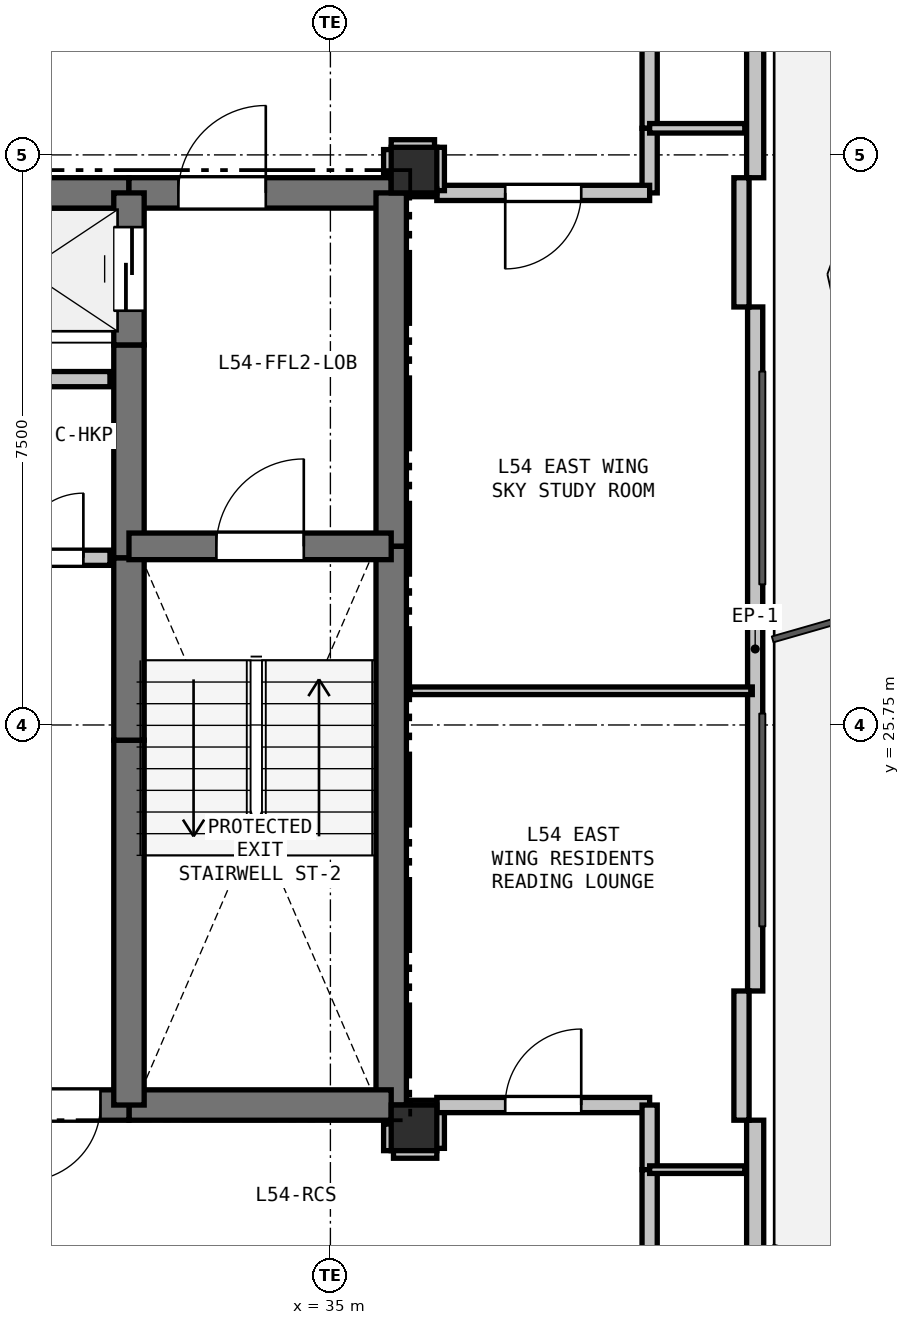
"""IFC4 building model, lengths in metres.
Left out: names, types, materials, properties, quantities, classifications, styles, units other than length and angle.
Written with IfcOpenShell. Run it as: python <this file> out.ifc"""

import sys

from ifc_helpers import new_model, si_unit, direction, frame, frame_2d, origin, origin_2d, place, context, subcontext, project, spatial, rectangle, extrude, element, fill, save


model = new_model("IFC4")
c1 = context("Model", 3, precision=1e-05, world=origin(), true_north=direction((0.0, 1.0)))
c2 = subcontext(c1, "Body", "Model", "MODEL_VIEW")
j1 = project(units=[si_unit("LENGTHUNIT", "METRE"), si_unit("PLANEANGLEUNIT", "RADIAN")], contexts=[c1])
p1 = place(None, origin())
s1 = spatial("IfcSite", under=j1, at=p1, CompositionType="ELEMENT")
p2 = place(p1, origin())
s2 = spatial("IfcBuilding", under=s1, at=p2, CompositionType="ELEMENT")
p3 = place(p2, frame((0.0, 0.0, 195.3)))
s3 = spatial("IfcBuildingStorey", under=s2, at=p3, CompositionType="ELEMENT", Elevation=195.3)
for number, where, z_axis, x_axis in (
    (1, (36.1, 33.05, 0.0), (0.0, 0.0, 1.0), (1.0, 0.0, 0.0)),
    (2, (36.1, 20.45, 0.0), (0.0, 0.0, 1.0), (1.0, 0.0, 0.0)),
):
    element("IfcColumn", number, at=place(p3, frame(where, z_axis=z_axis, x_axis=x_axis)), inside=s3, PredefinedType="COLUMN", context=c2, shape_type="SweptSolid", body=[
        extrude(rectangle(XDim=0.6, YDim=0.6, at=origin_2d()), origin(), (0.0, 0.0, 1.0), 3.3),
    ])
p4 = place(p3, frame((40.588, 42.648, 0.0), z_axis=(0.0, 0.0, 1.0), x_axis=(0.0, -1.0, 0.0)))
e3 = element("IfcWall", 3, at=p4, inside=s3, PredefinedType="SOLIDWALL", context=c2, shape_type="SweptSolid", body=[
    extrude(rectangle(XDim=9.699, YDim=0.225, at=frame_2d((4.85, 0.0))), origin(), (0.0, 0.0, 1.0), 2.69),
])
p5 = place(p4, frame((1.73, 0.0, 0.0)))
e4 = element("IfcOpeningElement", 4, at=p5, cuts=e3, PredefinedType="OPENING", context=c2, shape_type="SweptSolid", body=[
    extrude(rectangle(XDim=1.0, YDim=2.1, at=frame_2d((0.5, 1.05))), frame((0.0, 0.123, 0.0), z_axis=(0.0, -1.0, 0.0), x_axis=(1.0, 0.0, 0.0)), (0.0, 0.0, 1.0), 0.245),
])
p6 = place(p3, frame((40.588, 31.25, 0.0), z_axis=(0.0, 0.0, 1.0), x_axis=(0.0, -1.0, 0.0)))
e5 = element("IfcWall", 5, at=p6, inside=s3, PredefinedType="PARAPET", context=c2, shape_type="SweptSolid", body=[
    extrude(rectangle(XDim=8.999, YDim=0.2, at=frame_2d((4.5, 0.0))), origin(), (0.0, 0.0, 1.0), 0.2),
])
p7 = place(p3, frame((40.588, 20.551, 0.0), z_axis=(0.0, 0.0, 1.0), x_axis=(0.0, -1.0, 0.0)))
e6 = element("IfcWall", 6, at=p7, inside=s3, PredefinedType="SOLIDWALL", context=c2, shape_type="SweptSolid", body=[
    extrude(rectangle(XDim=9.699, YDim=0.225, at=frame_2d((4.85, 0.0))), origin(), (0.0, 0.0, 1.0), 2.69),
])
p8 = place(p7, frame((6.395, 0.0, 0.9)))
e7 = element("IfcOpeningElement", 7, at=p8, cuts=e6, PredefinedType="OPENING", context=c2, shape_type="SweptSolid", body=[
    extrude(rectangle(XDim=1.5, YDim=1.5, at=frame_2d((0.75, 0.75))), frame((0.0, 0.123, 0.0), z_axis=(0.0, -1.0, 0.0), x_axis=(1.0, 0.0, 0.0)), (0.0, 0.0, 1.0), 0.245),
])
for number, where, z_axis, x_axis in (
    (8, (40.408, 32.949, 0.0), (0.0, 0.0, 1.0), (0.0, -1.0, 0.0)),
    (9, (40.408, 22.25, 0.0), (0.0, 0.0, 1.0), (0.0, -1.0, 0.0)),
):
    element("IfcWall", number, at=place(p3, frame(where, z_axis=z_axis, x_axis=x_axis)), inside=s3, PredefinedType="PARAPET", context=c2, shape_type="SweptSolid", body=[
        extrude(rectangle(XDim=1.7, YDim=0.2, at=frame_2d((0.85, 0.0))), origin(), (0.0, 0.0, 1.0), 2.69),
    ])
p9 = place(p3, frame((29.65, 32.75, 0.0), z_axis=(0.0, 0.0, 1.0), x_axis=(1.0, 0.0, 0.0)))
e10 = element("IfcWall", 10, at=p9, inside=s3, PredefinedType="SHEAR", context=c2, shape_type="SweptSolid", body=[
    extrude(rectangle(XDim=2.7, YDim=0.4, at=frame_2d((1.35, 0.0))), origin(), (0.0, 0.0, 1.0), 3.07),
])
p10 = place(p3, frame((32.35, 32.75, 0.0), z_axis=(0.0, 0.0, 1.0), x_axis=(1.0, 0.0, 0.0)))
e11 = element("IfcWall", 11, at=p10, inside=s3, PredefinedType="SHEAR", context=c2, shape_type="SweptSolid", body=[
    extrude(rectangle(XDim=3.45, YDim=0.4, at=frame_2d((1.725, 0.0))), origin(), (0.0, 0.0, 1.0), 3.07),
])
p11 = place(p10, frame((0.65, 0.0, 0.0)))
e12 = element("IfcOpeningElement", 12, at=p11, cuts=e11, PredefinedType="OPENING", context=c2, shape_type="SweptSolid", body=[
    extrude(rectangle(XDim=1.15, YDim=2.15, at=frame_2d((0.575, 1.075))), frame((0.0, 0.21, 0.0), z_axis=(0.0, -1.0, 0.0), x_axis=(1.0, 0.0, 0.0)), (0.0, 0.0, 1.0), 0.42),
])
p12 = place(p3, frame((35.8, 32.75, 0.0), z_axis=(0.0, 0.0, 1.0), x_axis=(0.0, -1.0, 0.0)))
e13 = element("IfcWall", 13, at=p12, inside=s3, PredefinedType="SHEAR", context=c2, shape_type="SweptSolid", body=[
    extrude(rectangle(XDim=4.65, YDim=0.4, at=frame_2d((2.325, 0.0))), origin(), (0.0, 0.0, 1.0), 3.07),
])
p13 = place(p3, frame((35.8, 28.1, 0.0), z_axis=(0.0, 0.0, 1.0), x_axis=(0.0, -1.0, 0.0)))
e14 = element("IfcWall", 14, at=p13, inside=s3, PredefinedType="SHEAR", context=c2, shape_type="SweptSolid", body=[
    extrude(rectangle(XDim=7.35, YDim=0.4, at=frame_2d((3.675, 0.0))), origin(), (0.0, 0.0, 1.0), 3.07),
])
p14 = place(p3, frame((35.8, 20.75, 0.0), z_axis=(0.0, 0.0, 1.0), x_axis=(-1.0, 0.0, 0.0)))
e15 = element("IfcWall", 15, at=p14, inside=s3, PredefinedType="SHEAR", context=c2, shape_type="SweptSolid", body=[
    extrude(rectangle(XDim=3.45, YDim=0.4, at=frame_2d((1.725, 0.0))), origin(), (0.0, 0.0, 1.0), 3.07),
])
p15 = place(p3, frame((32.35, 20.75, 0.0), z_axis=(0.0, 0.0, 1.0), x_axis=(-1.0, 0.0, 0.0)))
e16 = element("IfcWall", 16, at=p15, inside=s3, PredefinedType="SHEAR", context=c2, shape_type="SweptSolid", body=[
    extrude(rectangle(XDim=1.75, YDim=0.4, at=frame_2d((0.875, 0.0))), origin(), (0.0, 0.0, 1.0), 3.07),
])
p16 = place(p15, frame((0.375, 0.0, 0.0)))
e17 = element("IfcOpeningElement", 17, at=p16, cuts=e16, PredefinedType="OPENING", context=c2, shape_type="SweptSolid", body=[
    extrude(rectangle(XDim=1.0, YDim=2.15, at=frame_2d((0.5, 1.075))), frame((0.0, 0.21, 0.0), z_axis=(0.0, -1.0, 0.0), x_axis=(1.0, 0.0, 0.0)), (0.0, 0.0, 1.0), 0.42),
])
p17 = place(p3, frame((32.35, 20.75, 0.0), z_axis=(0.0, 0.0, 1.0), x_axis=(0.0, 1.0, 0.0)))
e18 = element("IfcWall", 18, at=p17, inside=s3, PredefinedType="SHEAR", context=c2, shape_type="SweptSolid", body=[
    extrude(rectangle(XDim=4.8, YDim=0.4, at=frame_2d((2.4, 0.0))), origin(), (0.0, 0.0, 1.0), 3.07),
])
p18 = place(p3, frame((32.35, 25.55, 0.0), z_axis=(0.0, 0.0, 1.0), x_axis=(0.0, 1.0, 0.0)))
e19 = element("IfcWall", 19, at=p18, inside=s3, PredefinedType="SHEAR", context=c2, shape_type="SweptSolid", body=[
    extrude(rectangle(XDim=2.4, YDim=0.4, at=frame_2d((1.2, 0.0))), origin(), (0.0, 0.0, 1.0), 3.07),
])
p19 = place(p3, frame((32.35, 27.95, 0.0), z_axis=(0.0, 0.0, 1.0), x_axis=(0.0, 1.0, 0.0)))
e20 = element("IfcWall", 20, at=p19, inside=s3, PredefinedType="SHEAR", context=c2, shape_type="SweptSolid", body=[
    extrude(rectangle(XDim=2.8, YDim=0.4, at=frame_2d((1.4, 0.0))), origin(), (0.0, 0.0, 1.0), 3.07),
])
p20 = place(p3, frame((32.35, 30.75, 0.0), z_axis=(0.0, 0.0, 1.0), x_axis=(0.0, 1.0, 0.0)))
e21 = element("IfcWall", 21, at=p20, inside=s3, PredefinedType="SHEAR", context=c2, shape_type="SweptSolid", body=[
    extrude(rectangle(XDim=2.0, YDim=0.4, at=frame_2d((1.0, 0.0))), origin(), (0.0, 0.0, 1.0), 3.07),
])
p21 = place(p20, frame((0.45, 0.0, 0.0)))
e22 = element("IfcOpeningElement", 22, at=p21, cuts=e21, PredefinedType="OPENING", context=c2, shape_type="SweptSolid", body=[
    extrude(rectangle(XDim=1.1, YDim=2.15, at=frame_2d((0.55, 1.075))), frame((0.0, 0.21, 0.0), z_axis=(0.0, -1.0, 0.0), x_axis=(1.0, 0.0, 0.0)), (0.0, 0.0, 1.0), 0.42),
])
p22 = place(p3, frame((32.35, 28.1, 0.0), z_axis=(0.0, 0.0, 1.0), x_axis=(1.0, 0.0, 0.0)))
e23 = element("IfcWall", 23, at=p22, inside=s3, PredefinedType="SHEAR", context=c2, shape_type="SweptSolid", body=[
    extrude(rectangle(XDim=3.45, YDim=0.35, at=frame_2d((1.725, 0.0))), origin(), (0.0, 0.0, 1.0), 3.07),
])
p23 = place(p22, frame((1.15, 0.0, 0.0)))
e24 = element("IfcOpeningElement", 24, at=p23, cuts=e23, PredefinedType="OPENING", context=c2, shape_type="SweptSolid", body=[
    extrude(rectangle(XDim=1.15, YDim=2.15, at=frame_2d((0.575, 1.075))), frame((0.0, 0.185, 0.0), z_axis=(0.0, -1.0, 0.0), x_axis=(1.0, 0.0, 0.0)), (0.0, 0.0, 1.0), 0.37),
])
p24 = place(p3, frame((32.1, 30.3, 0.0), z_axis=(0.0, 0.0, 1.0), x_axis=(-1.0, 0.0, 0.0)))
e25 = element("IfcWall", 25, at=p24, inside=s3, PredefinedType="PARTITIONING", context=c2, shape_type="SweptSolid", body=[
    extrude(rectangle(XDim=1.55, YDim=0.2, at=frame_2d((0.775, 0.0))), origin(), (0.0, 0.0, 1.0), 3.07),
])
p25 = place(p3, frame((30.55, 27.95, 0.0), z_axis=(0.0, 0.0, 1.0), x_axis=(1.0, 0.0, 0.0)))
e26 = element("IfcWall", 26, at=p25, inside=s3, PredefinedType="PARTITIONING", context=c2, shape_type="SweptSolid", body=[
    extrude(rectangle(XDim=1.55, YDim=0.2, at=frame_2d((0.775, 0.0))), origin(), (0.0, 0.0, 1.0), 3.07),
])
p26 = place(p25, frame((0.35, 0.0, 0.0)))
e27 = element("IfcOpeningElement", 27, at=p26, cuts=e26, PredefinedType="OPENING", context=c2, shape_type="SweptSolid", body=[
    extrude(rectangle(XDim=0.85, YDim=2.1, at=frame_2d((0.425, 1.05))), frame((0.0, 0.11, 0.0), z_axis=(0.0, -1.0, 0.0), x_axis=(1.0, 0.0, 0.0)), (0.0, 0.0, 1.0), 0.22),
])
p27 = place(p3, frame((39.2, 35.2, 0.0), z_axis=(0.0, 0.0, 1.0), x_axis=(0.0, -1.0, 0.0)))
e28 = element("IfcWall", 28, at=p27, inside=s3, PredefinedType="PARTITIONING", context=c2, shape_type="SweptSolid", body=[
    extrude(rectangle(XDim=1.6, YDim=0.2, at=frame_2d((0.8, 0.0))), origin(), (0.0, 0.0, 1.0), 3.07),
])
p28 = place(p3, frame((39.2, 33.6, 0.0), z_axis=(0.0, 0.0, 1.0), x_axis=(0.0, -1.0, 0.0)))
e29 = element("IfcWall", 29, at=p28, inside=s3, PredefinedType="PARTITIONING", context=c2, shape_type="SweptSolid", body=[
    extrude(rectangle(XDim=0.85, YDim=0.2, at=frame_2d((0.425, 0.0))), origin(), (0.0, 0.0, 1.0), 3.07),
])
p29 = place(p3, frame((39.2, 32.75, 0.0), z_axis=(0.0, 0.0, 1.0), x_axis=(-1.0, 0.0, 0.0)))
e30 = element("IfcWall", 30, at=p29, inside=s3, PredefinedType="PARTITIONING", context=c2, shape_type="SweptSolid", body=[
    extrude(rectangle(XDim=2.8, YDim=0.2, at=frame_2d((1.4, 0.0))), origin(), (0.0, 0.0, 1.0), 3.07),
])
p30 = place(p29, frame((0.9, 0.0, 0.0)))
e31 = element("IfcOpeningElement", 31, at=p30, cuts=e30, PredefinedType="OPENING", context=c2, shape_type="SweptSolid", body=[
    extrude(rectangle(XDim=1.0, YDim=2.15, at=frame_2d((0.5, 1.075))), frame((0.0, 0.11, 0.0), z_axis=(0.0, -1.0, 0.0), x_axis=(1.0, 0.0, 0.0)), (0.0, 0.0, 1.0), 0.22),
])
for number, where, z_axis, x_axis in (
    (32, (36.4, 32.78, 0.0), (0.0, 0.0, 1.0), (0.0, 1.0, 0.0)),
    (33, (36.37, 33.35, 0.0), (0.0, 0.0, 1.0), (-1.0, 0.0, 0.0)),
):
    element("IfcWall", number, at=place(p3, frame(where, z_axis=z_axis, x_axis=x_axis)), inside=s3, PredefinedType="PARTITIONING", context=c2, shape_type="SweptSolid", body=[
        extrude(rectangle(XDim=0.57, YDim=0.2, at=frame_2d((0.285, 0.0))), origin(), (0.0, 0.0, 1.0), 2.518),
    ])
p31 = place(p3, frame((35.8, 33.32, 0.0), z_axis=(0.0, 0.0, 1.0), x_axis=(0.0, -1.0, 0.0)))
e34 = element("IfcWall", 34, at=p31, inside=s3, PredefinedType="PARTITIONING", context=c2, shape_type="SweptSolid", body=[
    extrude(rectangle(XDim=0.32, YDim=0.2, at=frame_2d((0.16, 0.0))), origin(), (0.0, 0.0, 1.0), 2.595),
])
p32 = place(p3, frame((35.8, 20.5, 0.0), z_axis=(0.0, 0.0, 1.0), x_axis=(0.0, -1.0, 0.0)))
e35 = element("IfcWall", 35, at=p32, inside=s3, PredefinedType="PARTITIONING", context=c2, shape_type="SweptSolid", body=[
    extrude(rectangle(XDim=0.35, YDim=0.2, at=frame_2d((0.175, 0.0))), origin(), (0.0, 0.0, 1.0), 2.595),
])
p33 = place(p3, frame((35.83, 20.15, 0.0), z_axis=(0.0, 0.0, 1.0), x_axis=(1.0, 0.0, 0.0)))
e36 = element("IfcWall", 36, at=p33, inside=s3, PredefinedType="PARTITIONING", context=c2, shape_type="SweptSolid", body=[
    extrude(rectangle(XDim=0.57, YDim=0.2, at=frame_2d((0.285, 0.0))), origin(), (0.0, 0.0, 1.0), 2.518),
])
p34 = place(p3, frame((36.4, 20.18, 0.0), z_axis=(0.0, 0.0, 1.0), x_axis=(0.0, 1.0, 0.0)))
e37 = element("IfcWall", 37, at=p34, inside=s3, PredefinedType="PARTITIONING", context=c2, shape_type="SweptSolid", body=[
    extrude(rectangle(XDim=0.57, YDim=0.2, at=frame_2d((0.285, 0.0))), origin(), (0.0, 0.0, 1.0), 3.07),
])
p35 = place(p3, frame((36.4, 20.75, 0.0), z_axis=(0.0, 0.0, 1.0), x_axis=(1.0, 0.0, 0.0)))
e38 = element("IfcWall", 38, at=p35, inside=s3, PredefinedType="PARTITIONING", context=c2, shape_type="SweptSolid", body=[
    extrude(rectangle(XDim=2.8, YDim=0.2, at=frame_2d((1.4, 0.0))), origin(), (0.0, 0.0, 1.0), 3.07),
])
p36 = place(p35, frame((0.9, 0.0, 0.0)))
e39 = element("IfcOpeningElement", 39, at=p36, cuts=e38, PredefinedType="OPENING", context=c2, shape_type="SweptSolid", body=[
    extrude(rectangle(XDim=1.0, YDim=2.15, at=frame_2d((0.5, 1.075))), frame((0.0, 0.11, 0.0), z_axis=(0.0, -1.0, 0.0), x_axis=(1.0, 0.0, 0.0)), (0.0, 0.0, 1.0), 0.22),
])
p37 = place(p3, frame((39.2, 20.75, 0.0), z_axis=(0.0, 0.0, 1.0), x_axis=(0.0, -1.0, 0.0)))
e40 = element("IfcWall", 40, at=p37, inside=s3, PredefinedType="PARTITIONING", context=c2, shape_type="SweptSolid", body=[
    extrude(rectangle(XDim=0.85, YDim=0.2, at=frame_2d((0.425, 0.0))), origin(), (0.0, 0.0, 1.0), 3.07),
])
p38 = place(p3, frame((39.2, 19.9, 0.0), z_axis=(0.0, 0.0, 1.0), x_axis=(0.0, -1.0, 0.0)))
e41 = element("IfcWall", 41, at=p38, inside=s3, PredefinedType="PARTITIONING", context=c2, shape_type="SweptSolid", body=[
    extrude(rectangle(XDim=1.6, YDim=0.2, at=frame_2d((0.8, 0.0))), origin(), (0.0, 0.0, 1.0), 3.07),
])
p39 = place(p3, frame((36.05, 32.75, 0.0), z_axis=(0.0, 0.0, 1.0), x_axis=(1.0, 0.0, 0.0)))
e42 = element("IfcWall", 42, at=p39, inside=s3, PredefinedType="PARTITIONING", context=c2, shape_type="SweptSolid", body=[
    extrude(rectangle(XDim=0.35, YDim=0.1, at=frame_2d((0.175, 0.0))), origin(), (0.0, 0.0, 1.0), 2.595),
])
p40 = place(p3, frame((39.2, 33.6, 0.0), z_axis=(0.0, 0.0, 1.0), x_axis=(1.0, 0.0, 0.0)))
e43 = element("IfcWall", 43, at=p40, inside=s3, PredefinedType="PARTITIONING", context=c2, shape_type="SweptSolid", body=[
    extrude(rectangle(XDim=1.252, YDim=0.125, at=frame_2d((0.626, 0.0))), origin(), (0.0, 0.0, 1.0), 2.365),
])
p41 = place(p3, frame((40.55, 26.2, 0.0), z_axis=(0.0, 0.0, 1.0), x_axis=(-1.0, 0.0, 0.0)))
e44 = element("IfcWall", 44, at=p41, inside=s3, PredefinedType="PARTITIONING", context=c2, shape_type="SweptSolid", body=[
    extrude(rectangle(XDim=4.5, YDim=0.1, at=frame_2d((2.25, 0.0))), origin(), (0.0, 0.0, 1.0), 2.365),
])
p42 = place(p3, frame((36.4, 20.75, 0.0), z_axis=(0.0, 0.0, 1.0), x_axis=(-1.0, 0.0, 0.0)))
e45 = element("IfcWall", 45, at=p42, inside=s3, PredefinedType="PARTITIONING", context=c2, shape_type="SweptSolid", body=[
    extrude(rectangle(XDim=0.35, YDim=0.125, at=frame_2d((0.175, 0.0))), origin(), (0.0, 0.0, 1.0), 2.595),
])
p43 = place(p3, frame((40.452, 19.9, 0.0), z_axis=(0.0, 0.0, 1.0), x_axis=(-1.0, 0.0, 0.0)))
e46 = element("IfcWall", 46, at=p43, inside=s3, PredefinedType="PARTITIONING", context=c2, shape_type="SweptSolid", body=[
    extrude(rectangle(XDim=1.252, YDim=0.1, at=frame_2d((0.626, 0.0))), origin(), (0.0, 0.0, 1.0), 2.365),
])
p44 = place(p16, origin())
e47 = element("IfcDoor", 47, at=p44, inside=s3, OperationType="SINGLE_SWING_RIGHT", PredefinedType="DOOR", context=c2, shape_type="SweptSolid", body=[
    extrude(rectangle(XDim=1.0, YDim=2.15, at=frame_2d((0.5, 1.075))), frame((0.0, 0.025, 0.0), z_axis=(0.0, -1.0, 0.0), x_axis=(1.0, 0.0, 0.0)), (0.0, 0.0, 1.0), 0.05),
])
fill(e17, e47)
p45 = place(p21, origin())
e48 = element("IfcDoor", 48, at=p45, inside=s3, OperationType="SLIDING_TO_LEFT", PredefinedType="DOOR", context=c2, shape_type="SweptSolid", body=[
    extrude(rectangle(XDim=1.1, YDim=2.15, at=frame_2d((0.55, 1.075))), frame((0.0, 0.025, 0.0), z_axis=(0.0, -1.0, 0.0), x_axis=(1.0, 0.0, 0.0)), (0.0, 0.0, 1.0), 0.05),
])
fill(e22, e48)
p46 = place(p23, origin())
e49 = element("IfcDoor", 49, at=p46, inside=s3, OperationType="SINGLE_SWING_RIGHT", PredefinedType="DOOR", context=c2, shape_type="SweptSolid", body=[
    extrude(rectangle(XDim=1.15, YDim=2.15, at=frame_2d((0.575, 1.075))), frame((0.0, 0.025, 0.0), z_axis=(0.0, -1.0, 0.0), x_axis=(1.0, 0.0, 0.0)), (0.0, 0.0, 1.0), 0.05),
])
fill(e24, e49)
p47 = place(p11, origin())
e50 = element("IfcDoor", 50, at=p47, inside=s3, OperationType="SINGLE_SWING_RIGHT", PredefinedType="DOOR", context=c2, shape_type="SweptSolid", body=[
    extrude(rectangle(XDim=1.15, YDim=2.15, at=frame_2d((0.575, 1.075))), frame((0.0, 0.025, 0.0), z_axis=(0.0, -1.0, 0.0), x_axis=(1.0, 0.0, 0.0)), (0.0, 0.0, 1.0), 0.05),
])
fill(e12, e50)
p48 = place(p26, origin())
e51 = element("IfcDoor", 51, at=p48, inside=s3, OperationType="SINGLE_SWING_RIGHT", PredefinedType="DOOR", context=c2, shape_type="SweptSolid", body=[
    extrude(rectangle(XDim=0.85, YDim=2.1, at=frame_2d((0.425, 1.05))), frame((0.0, 0.025, 0.0), z_axis=(0.0, -1.0, 0.0), x_axis=(1.0, 0.0, 0.0)), (0.0, 0.0, 1.0), 0.05),
])
fill(e27, e51)
p49 = place(p30, origin())
e52 = element("IfcDoor", 52, at=p49, inside=s3, OperationType="SINGLE_SWING_RIGHT", PredefinedType="DOOR", context=c2, shape_type="SweptSolid", body=[
    extrude(rectangle(XDim=1.0, YDim=2.15, at=frame_2d((0.5, 1.075))), frame((0.0, 0.025, 0.0), z_axis=(0.0, -1.0, 0.0), x_axis=(1.0, 0.0, 0.0)), (0.0, 0.0, 1.0), 0.05),
])
fill(e31, e52)
p50 = place(p36, origin())
e53 = element("IfcDoor", 53, at=p50, inside=s3, OperationType="SINGLE_SWING_RIGHT", PredefinedType="DOOR", context=c2, shape_type="SweptSolid", body=[
    extrude(rectangle(XDim=1.0, YDim=2.15, at=frame_2d((0.5, 1.075))), frame((0.0, 0.025, 0.0), z_axis=(0.0, -1.0, 0.0), x_axis=(1.0, 0.0, 0.0)), (0.0, 0.0, 1.0), 0.05),
])
fill(e39, e53)
save(model, sys.argv[1])
